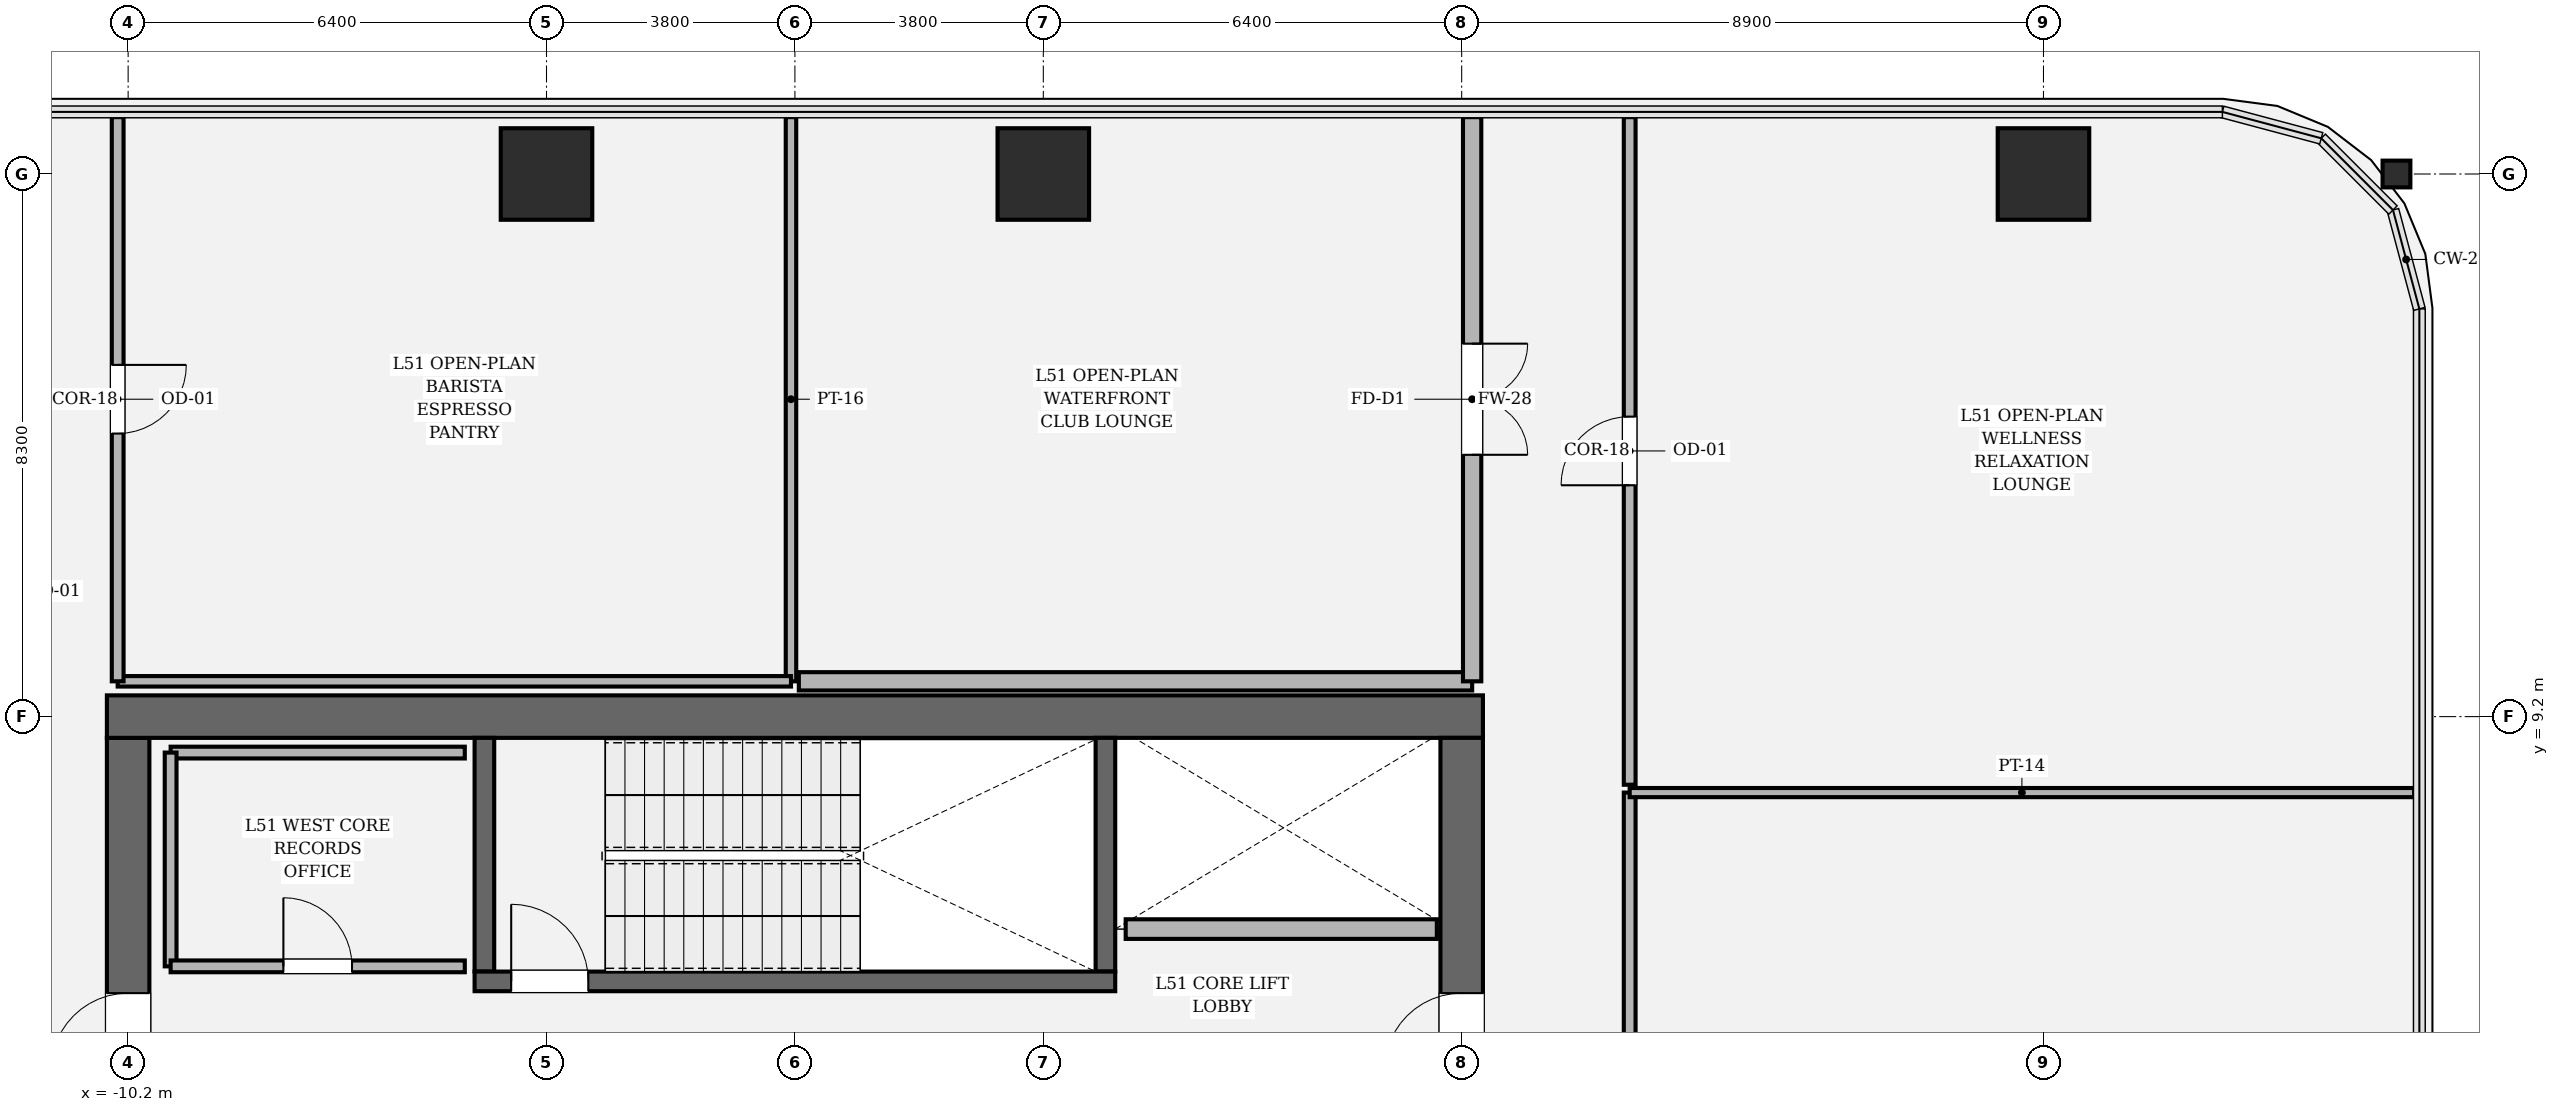
"""IFC4 building model, lengths in metres.
Left out: names, types, materials, properties, quantities, classifications, styles, units other than length and angle.
Written with IfcOpenShell. Run it as: python <this file> out.ifc"""

import sys

from ifc_helpers import new_model, si_unit, direction, frame, frame_2d, origin, origin_2d, place, context, subcontext, project, spatial, rectangle, hollow_rectangle, i_section, extrude, element, fill, save


model = new_model("IFC4")
c1 = context("Model", 3, precision=1e-05, world=origin(), true_north=direction((0.0, 1.0)))
c2 = subcontext(c1, "Body", "Model", "MODEL_VIEW")
j1 = project(units=[si_unit("LENGTHUNIT", "METRE"), si_unit("PLANEANGLEUNIT", "RADIAN")], contexts=[c1])
p1 = place(None, origin())
s1 = spatial("IfcSite", under=j1, at=p1, CompositionType="ELEMENT")
p2 = place(p1, origin())
s2 = spatial("IfcBuilding", under=s1, at=p2, CompositionType="ELEMENT")
p3 = place(p2, frame((0.0, 0.0, 216.75)))
s3 = spatial("IfcBuildingStorey", under=s2, at=p3, CompositionType="ELEMENT", Elevation=216.75)
p4 = place(p3, frame((-10.2, -8.875, 0.0), z_axis=(0.0, 0.0, 1.0), x_axis=(0.0, 1.0, 0.0)))
e1 = element("IfcWall", 1, at=p4, inside=s3, PredefinedType="SHEAR", context=c2, shape_type="SweptSolid", body=[
    extrude(rectangle(XDim=17.75, YDim=0.65, at=frame_2d((8.875, 0.0))), origin(), (0.0, 0.0, 1.0), 4.05),
])
p5 = place(p4, frame((12.665, 0.0, 0.0)))
e2 = element("IfcOpeningElement", 2, at=p5, cuts=e1, PredefinedType="OPENING", context=c2, shape_type="SweptSolid", body=[
    extrude(rectangle(XDim=1.18, YDim=2.2, at=frame_2d((0.59, 1.1))), frame((0.0, 0.335, 0.0), z_axis=(0.0, -1.0, 0.0), x_axis=(1.0, 0.0, 0.0)), (0.0, 0.0, 1.0), 0.67),
])
p6 = place(p3, frame((-10.525, 9.2, 0.0), z_axis=(0.0, 0.0, 1.0), x_axis=(1.0, 0.0, 0.0)))
e3 = element("IfcWall", 3, at=p6, inside=s3, PredefinedType="SHEAR", context=c2, shape_type="SweptSolid", body=[
    extrude(rectangle(XDim=21.05, YDim=0.65, at=frame_2d((10.525, 0.0))), origin(), (0.0, 0.0, 1.0), 4.05),
])
p7 = place(p3, frame((10.2, 8.875, 0.0), z_axis=(0.0, 0.0, 1.0), x_axis=(0.0, -1.0, 0.0)))
e4 = element("IfcWall", 4, at=p7, inside=s3, PredefinedType="SHEAR", context=c2, shape_type="SweptSolid", body=[
    extrude(rectangle(XDim=17.75, YDim=0.65, at=frame_2d((8.875, 0.0))), origin(), (0.0, 0.0, 1.0), 4.05),
])
p8 = place(p7, frame((3.905, 0.0, 0.0)))
e5 = element("IfcOpeningElement", 5, at=p8, cuts=e4, PredefinedType="OPENING", context=c2, shape_type="SweptSolid", body=[
    extrude(rectangle(XDim=1.18, YDim=2.2, at=frame_2d((0.59, 1.1))), frame((0.0, 0.335, 0.0), z_axis=(0.0, -1.0, 0.0), x_axis=(1.0, 0.0, 0.0)), (0.0, 0.0, 1.0), 0.67),
])
for number, where, z_axis, x_axis in (
    (6, (-4.75, 5.3, 0.0), (0.0, 0.0, 1.0), (0.0, 1.0, 0.0)),
    (7, (4.75, 8.875, 0.0), (0.0, 0.0, 1.0), (0.0, -1.0, 0.0)),
):
    element("IfcWall", number, at=place(p3, frame(where, z_axis=z_axis, x_axis=x_axis)), inside=s3, PredefinedType="SOLIDWALL", context=c2, shape_type="SweptSolid", body=[
        extrude(rectangle(XDim=3.575, YDim=0.3, at=frame_2d((1.788, 0.0))), origin(), (0.0, 0.0, 1.0), 4.05),
    ])
p9 = place(p3, frame((-4.9, 5.15, 0.0), z_axis=(0.0, 0.0, 1.0), x_axis=(1.0, 0.0, 0.0)))
e8 = element("IfcWall", 8, at=p9, inside=s3, PredefinedType="SOLIDWALL", context=c2, shape_type="SweptSolid", body=[
    extrude(rectangle(XDim=9.8, YDim=0.3, at=frame_2d((4.9, 0.0))), origin(), (0.0, 0.0, 1.0), 4.05),
])
p10 = place(p9, frame((0.56, 0.0, 0.0)))
e9 = element("IfcOpeningElement", 9, at=p10, cuts=e8, PredefinedType="OPENING", context=c2, shape_type="SweptSolid", body=[
    extrude(rectangle(XDim=1.18, YDim=2.2, at=frame_2d((0.59, 1.1))), frame((0.0, 0.16, 0.0), z_axis=(0.0, -1.0, 0.0), x_axis=(1.0, 0.0, 0.0)), (0.0, 0.0, 1.0), 0.32),
])
for number, where, z_axis, x_axis in (
    (10, (19.1, 17.5, 0.0), (0.0, 0.0, 1.0), (1.0, 0.0, 0.0)),
    (11, (3.8, 17.5, 0.0), (0.0, 0.0, 1.0), (1.0, 0.0, 0.0)),
    (12, (-3.8, 17.5, 0.0), (0.0, 0.0, 1.0), (1.0, 0.0, 0.0)),
):
    element("IfcColumn", number, at=place(p3, frame(where, z_axis=z_axis, x_axis=x_axis)), inside=s3, PredefinedType="COLUMN", context=c2, shape_type="SweptSolid", body=[
        extrude(hollow_rectangle(XDim=1.4, YDim=1.4, WallThickness=0.042, at=origin_2d()), origin(), (0.0, 0.0, 1.0), 4.05),
    ])
p11 = place(p3, frame((24.5, 17.5, 0.0), z_axis=(0.0, 0.0, 1.0), x_axis=(0.0, 1.0, 0.0)))
e13 = element("IfcColumn", 13, at=p11, inside=s3, PredefinedType="COLUMN", context=c2, shape_type="SweptSolid", body=[
    extrude(i_section(OverallWidth=0.409, OverallDepth=0.425, WebThickness=0.032, FlangeThickness=0.052, FilletRadius=0.018, at=origin_2d()), origin(), (0.0, 0.0, 1.0), 4.048),
])
p12 = place(p3, frame((5.06, 5.95, 0.0), z_axis=(0.0, 0.0, 1.0), x_axis=(1.0, 0.0, 0.0)))
e14 = element("IfcWall", 14, at=p12, inside=s3, PredefinedType="SOLIDWALL", context=c2, shape_type="SweptSolid", body=[
    extrude(rectangle(XDim=4.76, YDim=0.3, at=frame_2d((2.38, 0.0))), origin(), (0.0, 0.0, 1.0), 3.83),
])
p13 = place(p3, frame((-5.05, 8.65, 0.0), z_axis=(0.0, 0.0, 1.0), x_axis=(-1.0, 0.0, 0.0)))
e15 = element("IfcWall", 15, at=p13, inside=s3, PredefinedType="PARTITIONING", context=c2, shape_type="SweptSolid", body=[
    extrude(rectangle(XDim=4.5, YDim=0.18, at=frame_2d((2.25, 0.0))), origin(), (0.0, 0.0, 1.0), 3.83),
])
p14 = place(p3, frame((-9.55, 8.65, 0.0), z_axis=(0.0, 0.0, 1.0), x_axis=(0.0, -1.0, 0.0)))
e16 = element("IfcWall", 16, at=p14, inside=s3, PredefinedType="PARTITIONING", context=c2, shape_type="SweptSolid", body=[
    extrude(rectangle(XDim=3.27, YDim=0.18, at=frame_2d((1.635, 0.0))), origin(), (0.0, 0.0, 1.0), 3.83),
])
p15 = place(p3, frame((-9.55, 5.38, 0.0), z_axis=(0.0, 0.0, 1.0), x_axis=(1.0, 0.0, 0.0)))
e17 = element("IfcWall", 17, at=p15, inside=s3, PredefinedType="PARTITIONING", context=c2, shape_type="SweptSolid", body=[
    extrude(rectangle(XDim=4.5, YDim=0.18, at=frame_2d((2.25, 0.0))), origin(), (0.0, 0.0, 1.0), 3.83),
])
p16 = place(p15, frame((1.725, 0.0, 0.0)))
e18 = element("IfcOpeningElement", 18, at=p16, cuts=e17, PredefinedType="OPENING", context=c2, shape_type="SweptSolid", body=[
    extrude(rectangle(XDim=1.05, YDim=2.2, at=frame_2d((0.525, 1.1))), frame((0.0, 0.1, 0.0), z_axis=(0.0, -1.0, 0.0), x_axis=(1.0, 0.0, 0.0)), (0.0, 0.0, 1.0), 0.2),
])
p17 = place(p3, frame((12.77, -11.49, 0.0), z_axis=(0.0, 0.0, 1.0), x_axis=(0.0, 1.0, 0.0)))
e19 = element("IfcWall", 19, at=p17, inside=s3, PredefinedType="PARTITIONING", context=c2, shape_type="SweptSolid", body=[
    extrude(rectangle(XDim=19.528, YDim=0.18, at=frame_2d((9.764, 0.0))), origin(), (0.0, 0.0, 1.0), 2.504),
])
p18 = place(p17, frame((9.239, 0.0, 0.0)))
e20 = element("IfcOpeningElement", 20, at=p18, cuts=e19, PredefinedType="OPENING", context=c2, shape_type="SweptSolid", body=[
    extrude(rectangle(XDim=1.05, YDim=2.2, at=frame_2d((0.525, 1.1))), frame((0.0, 0.1, 0.0), z_axis=(0.0, -1.0, 0.0), x_axis=(1.0, 0.0, 0.0)), (0.0, 0.0, 1.0), 0.2),
])
p19 = place(p3, frame((12.77, 8.038, 0.0), z_axis=(0.0, 0.0, 1.0), x_axis=(1.0, 0.0, 0.0)))
e21 = element("IfcWall", 21, at=p19, inside=s3, PredefinedType="PARTITIONING", context=c2, shape_type="SweptSolid", body=[
    extrude(rectangle(XDim=12.0, YDim=0.14, at=frame_2d((6.0, 0.0))), origin(), (0.0, 0.0, 1.0), 2.504),
])
p20 = place(p3, frame((12.77, 8.158, 0.0), z_axis=(0.0, 0.0, 1.0), x_axis=(0.0, 1.0, 0.0)))
e22 = element("IfcWall", 22, at=p20, inside=s3, PredefinedType="PARTITIONING", context=c2, shape_type="SweptSolid", body=[
    extrude(rectangle(XDim=10.212, YDim=0.18, at=frame_2d((5.106, 0.0))), origin(), (0.0, 0.0, 1.0), 2.504),
])
p21 = place(p20, frame((4.581, 0.0, 0.0)))
e23 = element("IfcOpeningElement", 23, at=p21, cuts=e22, PredefinedType="OPENING", context=c2, shape_type="SweptSolid", body=[
    extrude(rectangle(XDim=1.05, YDim=2.2, at=frame_2d((0.525, 1.1))), frame((0.0, 0.1, 0.0), z_axis=(0.0, -1.0, 0.0), x_axis=(1.0, 0.0, 0.0)), (0.0, 0.0, 1.0), 0.2),
])
p22 = place(p3, frame((-0.06, 18.37, 0.0), z_axis=(0.0, 0.0, 1.0), x_axis=(0.0, -1.0, 0.0)))
e24 = element("IfcWall", 24, at=p22, inside=s3, PredefinedType="PARTITIONING", context=c2, shape_type="SweptSolid", body=[
    extrude(rectangle(XDim=8.63, YDim=0.16, at=frame_2d((4.315, 0.0))), origin(), (0.0, 0.0, 1.0), 2.504),
])
p23 = place(p3, frame((-0.06, 9.74, 0.0), z_axis=(0.0, 0.0, 1.0), x_axis=(-1.0, 0.0, 0.0)))
e25 = element("IfcWall", 25, at=p23, inside=s3, PredefinedType="PARTITIONING", context=c2, shape_type="SweptSolid", body=[
    extrude(rectangle(XDim=10.3, YDim=0.16, at=frame_2d((5.15, 0.0))), origin(), (0.0, 0.0, 1.0), 2.504),
])
p24 = place(p3, frame((-10.36, 9.74, 0.0), z_axis=(0.0, 0.0, 1.0), x_axis=(0.0, 1.0, 0.0)))
e26 = element("IfcWall", 26, at=p24, inside=s3, PredefinedType="PARTITIONING", context=c2, shape_type="SweptSolid", body=[
    extrude(rectangle(XDim=8.63, YDim=0.18, at=frame_2d((4.315, 0.0))), origin(), (0.0, 0.0, 1.0), 2.504),
])
p25 = place(p24, frame((3.79, 0.0, 0.0)))
e27 = element("IfcOpeningElement", 27, at=p25, cuts=e26, PredefinedType="OPENING", context=c2, shape_type="SweptSolid", body=[
    extrude(rectangle(XDim=1.05, YDim=2.2, at=frame_2d((0.525, 1.1))), frame((0.0, 0.1, 0.0), z_axis=(0.0, -1.0, 0.0), x_axis=(1.0, 0.0, 0.0)), (0.0, 0.0, 1.0), 0.2),
])
p26 = place(p3, frame((10.36, 9.74, 0.0), z_axis=(0.0, 0.0, 1.0), x_axis=(-1.0, 0.0, 0.0)))
e28 = element("IfcWall", 28, at=p26, inside=s3, PredefinedType="SOLIDWALL", context=c2, shape_type="SweptSolid", body=[
    extrude(rectangle(XDim=10.3, YDim=0.28, at=frame_2d((5.15, 0.0))), origin(), (0.0, 0.0, 1.0), 2.504),
])
p27 = place(p3, frame((10.36, 18.37, 0.0), z_axis=(0.0, 0.0, 1.0), x_axis=(0.0, -1.0, 0.0)))
e29 = element("IfcWall", 29, at=p27, inside=s3, PredefinedType="SOLIDWALL", context=c2, shape_type="SweptSolid", body=[
    extrude(rectangle(XDim=8.63, YDim=0.28, at=frame_2d((4.315, 0.0))), origin(), (0.0, 0.0, 1.0), 2.504),
])
p28 = place(p27, frame((3.465, 0.0, 0.0)))
e30 = element("IfcOpeningElement", 30, at=p28, cuts=e29, PredefinedType="OPENING", context=c2, shape_type="SweptSolid", body=[
    extrude(rectangle(XDim=1.7, YDim=2.3, at=frame_2d((0.85, 1.15))), frame((0.0, 0.15, 0.0), z_axis=(0.0, -1.0, 0.0), x_axis=(1.0, 0.0, 0.0)), (0.0, 0.0, 1.0), 0.3),
])
p29 = place(p10, origin())
e31 = element("IfcDoor", 31, at=p29, inside=s3, OperationType="SINGLE_SWING_LEFT", PredefinedType="DOOR", context=c2, shape_type="SweptSolid", body=[
    extrude(rectangle(XDim=1.18, YDim=2.2, at=frame_2d((0.59, 1.1))), frame((0.0, 0.025, 0.0), z_axis=(0.0, -1.0, 0.0), x_axis=(1.0, 0.0, 0.0)), (0.0, 0.0, 1.0), 0.05),
])
fill(e9, e31)
p30 = place(p5, origin())
e32 = element("IfcDoor", 32, at=p30, inside=s3, OperationType="SINGLE_SWING_LEFT", PredefinedType="DOOR", context=c2, shape_type="SweptSolid", body=[
    extrude(rectangle(XDim=1.18, YDim=2.2, at=frame_2d((0.59, 1.1))), frame((0.0, 0.025, 0.0), z_axis=(0.0, -1.0, 0.0), x_axis=(1.0, 0.0, 0.0)), (0.0, 0.0, 1.0), 0.05),
])
fill(e2, e32)
p31 = place(p8, origin())
e33 = element("IfcDoor", 33, at=p31, inside=s3, OperationType="SINGLE_SWING_RIGHT", PredefinedType="DOOR", context=c2, shape_type="SweptSolid", body=[
    extrude(rectangle(XDim=1.18, YDim=2.2, at=frame_2d((0.59, 1.1))), frame((0.0, 0.025, 0.0), z_axis=(0.0, -1.0, 0.0), x_axis=(1.0, 0.0, 0.0)), (0.0, 0.0, 1.0), 0.05),
])
fill(e5, e33)
p32 = place(p16, origin())
e34 = element("IfcDoor", 34, at=p32, inside=s3, OperationType="SINGLE_SWING_LEFT", PredefinedType="DOOR", context=c2, shape_type="SweptSolid", body=[
    extrude(rectangle(XDim=1.05, YDim=2.2, at=frame_2d((0.525, 1.1))), frame((0.0, 0.025, 0.0), z_axis=(0.0, -1.0, 0.0), x_axis=(1.0, 0.0, 0.0)), (0.0, 0.0, 1.0), 0.05),
])
fill(e18, e34)
p33 = place(p21, origin())
e35 = element("IfcDoor", 35, at=p33, inside=s3, OperationType="SINGLE_SWING_LEFT", PredefinedType="DOOR", context=c2, shape_type="SweptSolid", body=[
    extrude(rectangle(XDim=1.05, YDim=2.2, at=frame_2d((0.525, 1.1))), frame((0.0, 0.025, 0.0), z_axis=(0.0, -1.0, 0.0), x_axis=(1.0, 0.0, 0.0)), (0.0, 0.0, 1.0), 0.05),
])
fill(e23, e35)
p34 = place(p25, origin())
e36 = element("IfcDoor", 36, at=p34, inside=s3, OperationType="SINGLE_SWING_RIGHT", PredefinedType="DOOR", context=c2, shape_type="SweptSolid", body=[
    extrude(rectangle(XDim=1.05, YDim=2.2, at=frame_2d((0.525, 1.1))), frame((0.0, 0.025, 0.0), z_axis=(0.0, -1.0, 0.0), x_axis=(1.0, 0.0, 0.0)), (0.0, 0.0, 1.0), 0.05),
])
fill(e27, e36)
p35 = place(p28, origin())
e37 = element("IfcDoor", 37, at=p35, inside=s3, OperationType="DOUBLE_DOOR_SINGLE_SWING", PredefinedType="DOOR", context=c2, shape_type="SweptSolid", body=[
    extrude(rectangle(XDim=1.7, YDim=2.3, at=frame_2d((0.85, 1.15))), frame((0.0, 0.025, 0.0), z_axis=(0.0, -1.0, 0.0), x_axis=(1.0, 0.0, 0.0)), (0.0, 0.0, 1.0), 0.05),
])
fill(e30, e37)
save(model, sys.argv[1])
